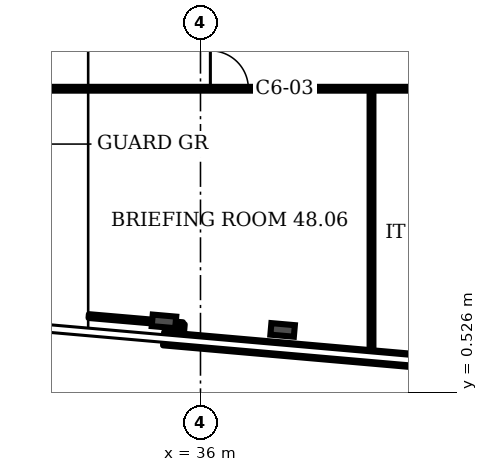
"""IFC4 building model, lengths in metres.
Left out: names, types, materials, properties, quantities, classifications, styles, units other than length and angle.
Written with IfcOpenShell. Run it as: python <this file> out.ifc"""

import sys

from ifc_helpers import new_model, si_unit, direction, frame, frame_2d, origin, origin_2d, place, context, subcontext, project, spatial, rectangle, i_section, extrude, element, fill, save


model = new_model("IFC4")
c1 = context("Model", 3, precision=1e-05, world=origin(), true_north=direction((0.0, 1.0)))
c2 = subcontext(c1, "Body", "Model", "MODEL_VIEW")
j1 = project(units=[si_unit("LENGTHUNIT", "METRE"), si_unit("PLANEANGLEUNIT", "RADIAN")], contexts=[c1])
p1 = place(None, origin())
s1 = spatial("IfcSite", under=j1, at=p1, CompositionType="ELEMENT")
p2 = place(p1, origin())
s2 = spatial("IfcBuilding", under=s1, at=p2, CompositionType="ELEMENT")
p3 = place(p2, frame((0.0, 0.0, 195.1)))
s3 = spatial("IfcBuildingStorey", under=s2, at=p3, CompositionType="ELEMENT", Elevation=195.1)
for number, where, z_axis, x_axis in (
    (1, (35.039, 2.399, 0.0), (0.0, 0.0, 1.0), (-0.087, -0.996, 0.0)),
    (2, (38.161, 2.174, 0.0), (0.0, 0.0, 1.0), (-0.087, -0.996, 0.0)),
):
    element("IfcColumn", number, at=place(p3, frame(where, z_axis=z_axis, x_axis=x_axis)), inside=s3, PredefinedType="COLUMN", context=c2, shape_type="SweptSolid", body=[
        extrude(i_section(OverallWidth=0.305, OverallDepth=0.62, WebThickness=0.021, FlangeThickness=0.04, FilletRadius=0.027, at=origin_2d()), origin(), (0.0, 0.0, 1.0), 3.6),
    ])
p4 = place(p3, frame((35.03, 1.943, 0.0), z_axis=(0.0, 0.0, 1.0), x_axis=(0.996199, -0.08714, 0.0)))
e3 = element("IfcWall", 3, at=p4, inside=s3, PredefinedType="SOLIDWALL", context=c2, shape_type="SweptSolid", body=[
    extrude(rectangle(XDim=11.028, YDim=0.35, at=frame_2d((5.514, 0.0))), origin(), (0.0, 0.0, 1.0), 1.0),
])
p5 = place(p3, frame((31.714, 8.52, 0.0), z_axis=(0.0, 0.0, 1.0), x_axis=(1.0, 0.0, 0.0)))
e4 = element("IfcWall", 4, at=p5, inside=s3, PredefinedType="PARTITIONING", context=c2, shape_type="SweptSolid", body=[
    extrude(rectangle(XDim=32.072, YDim=0.1, at=frame_2d((16.036, 0.0))), origin(), (0.0, 0.0, 1.0), 3.2),
])
p6 = place(p5, frame((4.546, 0.0, 0.0)))
e5 = element("IfcOpeningElement", 5, at=p6, cuts=e4, PredefinedType="OPENING", context=c2, shape_type="SweptSolid", body=[
    extrude(rectangle(XDim=1.0, YDim=2.1, at=frame_2d((0.5, 1.05))), frame((0.0, 0.06, 0.0), z_axis=(0.0, -1.0, 0.0), x_axis=(1.0, 0.0, 0.0)), (0.0, 0.0, 1.0), 0.12),
])
p7 = place(p5, frame((12.206, 0.0, 0.0)))
e6 = element("IfcOpeningElement", 6, at=p7, cuts=e4, PredefinedType="OPENING", context=c2, shape_type="SweptSolid", body=[
    extrude(rectangle(XDim=1.0, YDim=2.1, at=frame_2d((0.5, 1.05))), frame((0.0, 0.06, 0.0), z_axis=(0.0, -1.0, 0.0), x_axis=(1.0, 0.0, 0.0)), (0.0, 0.0, 1.0), 0.12),
])
p8 = place(p5, frame((21.606, 0.0, 0.0)))
e7 = element("IfcOpeningElement", 7, at=p8, cuts=e4, PredefinedType="OPENING", context=c2, shape_type="SweptSolid", body=[
    extrude(rectangle(XDim=1.0, YDim=2.1, at=frame_2d((0.5, 1.05))), frame((0.0, 0.06, 0.0), z_axis=(0.0, -1.0, 0.0), x_axis=(1.0, 0.0, 0.0)), (0.0, 0.0, 1.0), 0.12),
])
p9 = place(p5, frame((28.106, 0.0, 0.0)))
e8 = element("IfcOpeningElement", 8, at=p9, cuts=e4, PredefinedType="OPENING", context=c2, shape_type="SweptSolid", body=[
    extrude(rectangle(XDim=1.0, YDim=2.1, at=frame_2d((0.5, 1.05))), frame((0.0, 0.06, 0.0), z_axis=(0.0, -1.0, 0.0), x_axis=(1.0, 0.0, 0.0)), (0.0, 0.0, 1.0), 0.12),
])
p10 = place(p3, frame((35.502, 1.927, 0.0), z_axis=(0.0, 0.0, 1.0), x_axis=(0.083045, 0.996542, 0.0)))
e9 = element("IfcWall", 9, at=p10, inside=s3, PredefinedType="PARTITIONING", context=c2, shape_type="SweptSolid", body=[
    extrude(rectangle(XDim=0.4, YDim=0.1, at=frame_2d((0.2, 0.0))), origin(), (0.0, 0.0, 1.0), 3.2),
])
p11 = place(p3, frame((35.535, 2.325, 0.0), z_axis=(0.0, 0.0, 1.0), x_axis=(-0.996311, 0.085867, 0.0)))
e10 = element("IfcWall", 10, at=p11, inside=s3, PredefinedType="PARTITIONING", context=c2, shape_type="SweptSolid", body=[
    extrude(rectangle(XDim=2.485, YDim=0.1, at=frame_2d((1.243, 0.0))), origin(), (0.0, 0.0, 1.0), 2.58),
])
p12 = place(p3, frame((40.5, 1.489, 0.0), z_axis=(0.0, 0.0, 1.0), x_axis=(0.0, 1.0, 0.0)))
e11 = element("IfcWall", 11, at=p12, inside=s3, PredefinedType="PARTITIONING", context=c2, shape_type="SweptSolid", body=[
    extrude(rectangle(XDim=7.031, YDim=0.1, at=frame_2d((3.515, 0.0))), origin(), (0.0, 0.0, 1.0), 3.2),
])
p13 = place(p6, origin())
e12 = element("IfcDoor", 12, at=p13, inside=s3, OperationType="SINGLE_SWING_LEFT", PredefinedType="DOOR", context=c2, shape_type="SweptSolid", body=[
    extrude(rectangle(XDim=1.0, YDim=2.1, at=frame_2d((0.5, 1.05))), frame((0.0, 0.025, 0.0), z_axis=(0.0, -1.0, 0.0), x_axis=(1.0, 0.0, 0.0)), (0.0, 0.0, 1.0), 0.05),
])
fill(e5, e12)
save(model, sys.argv[1])
